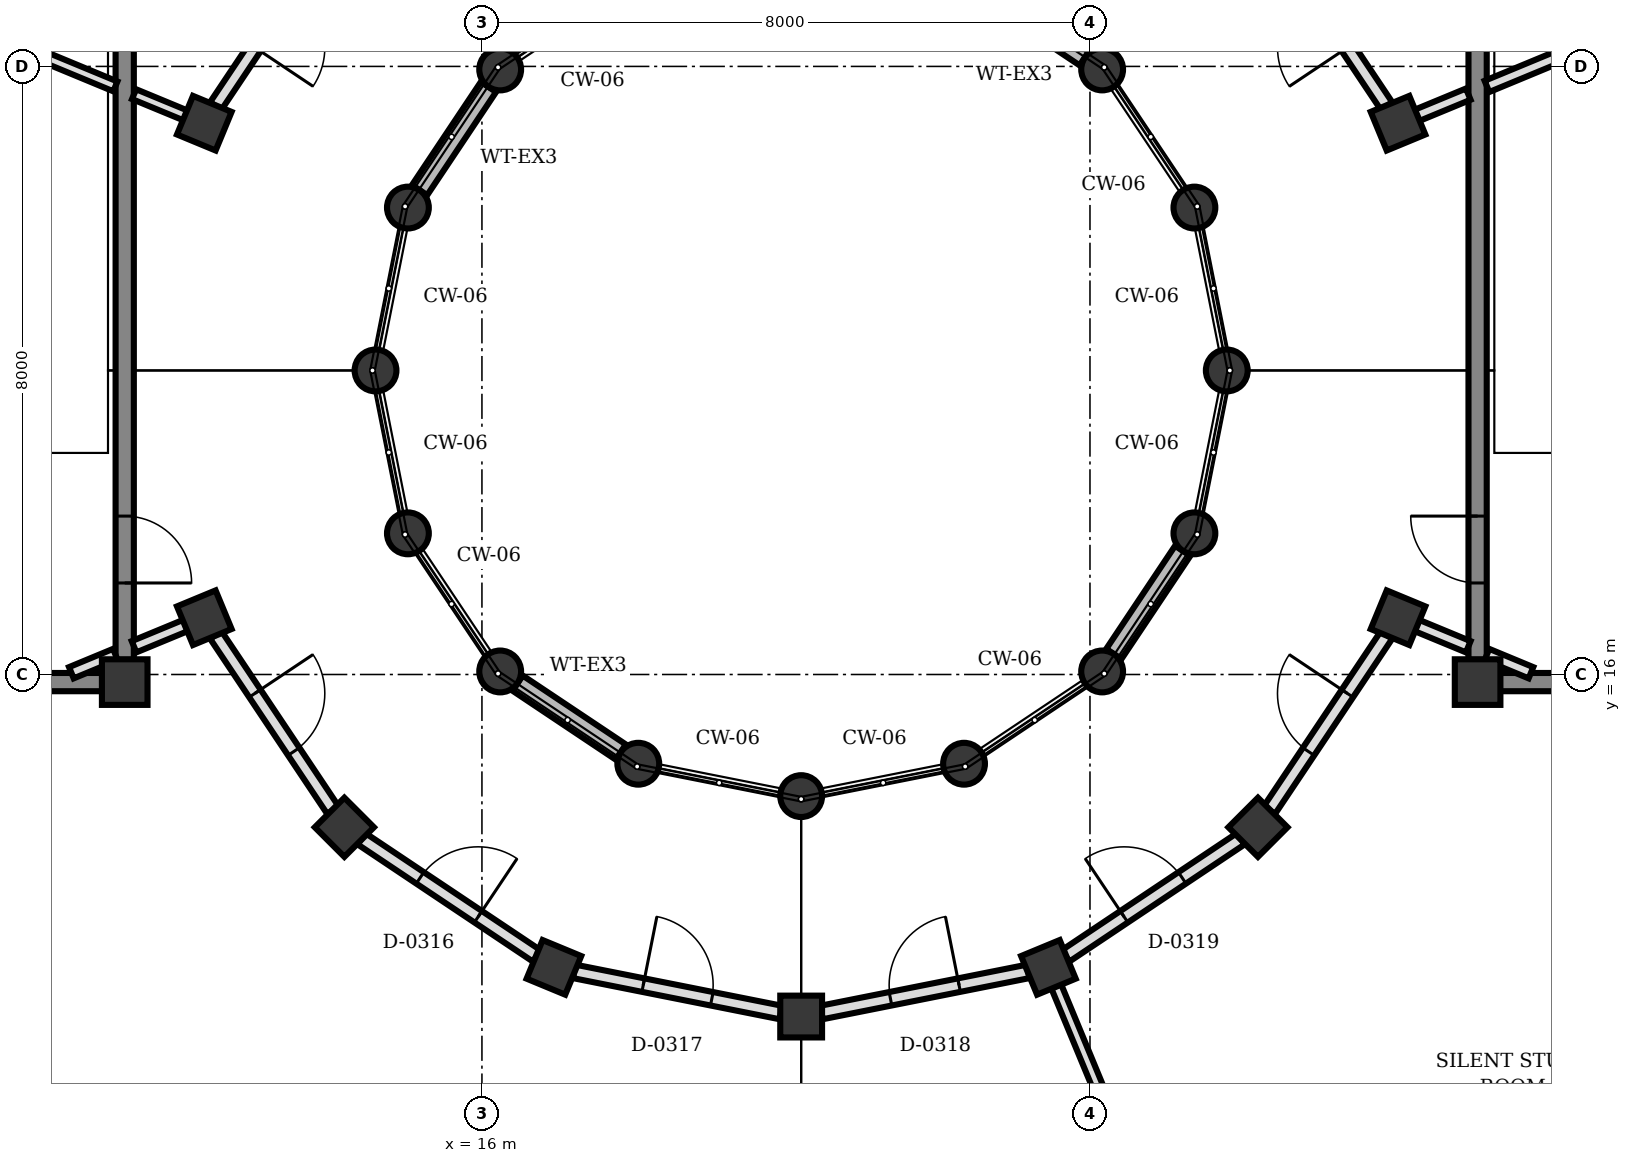
"""IFC4 building model, lengths in metres.
Left out: names, types, materials, properties, quantities, classifications, styles, units other than length and angle.
Written with IfcOpenShell. Run it as: python <this file> out.ifc"""

import sys

from ifc_helpers import new_model, si_unit, direction, frame, frame_2d, origin, origin_2d, place, context, subcontext, project, spatial, rectangle, circle, extrude, element, fill, save


model = new_model("IFC4")
c1 = context("Model", 3, precision=1e-05, world=origin(), true_north=direction((0.0, 1.0)))
c2 = subcontext(c1, "Body", "Model", "MODEL_VIEW")
j1 = project(units=[si_unit("LENGTHUNIT", "METRE"), si_unit("PLANEANGLEUNIT", "RADIAN")], contexts=[c1])
p1 = place(None, origin())
s1 = spatial("IfcSite", under=j1, at=p1, CompositionType="ELEMENT")
p2 = place(p1, origin())
s2 = spatial("IfcBuilding", under=s1, at=p2, CompositionType="ELEMENT")
p3 = place(p2, frame((0.0, 0.0, 12.5)))
s3 = spatial("IfcBuildingStorey", under=s2, at=p3, CompositionType="ELEMENT", Elevation=12.5)
for number, where, z_axis, x_axis in (
    (1, (11.3, 15.9, 0.0), (0.0, 0.0, 1.0), (1.0, 0.0, 0.0)),
    (2, (29.1, 15.9, 0.0), (0.0, 0.0, 1.0), (1.0, 0.0, 0.0)),
):
    element("IfcColumn", number, at=place(p3, frame(where, z_axis=z_axis, x_axis=x_axis)), inside=s3, PredefinedType="COLUMN", context=c2, shape_type="SweptSolid", body=[
        extrude(rectangle(XDim=0.6, YDim=0.6, at=origin_2d()), origin(), (0.0, 0.0, 1.0), 4.0),
    ])
for number, where, z_axis, x_axis in (
    (3, (25.8, 20.0, 0.0), (0.0, 0.0, 1.0), (1.0, 0.0, 0.0)),
    (4, (25.374, 22.143, 0.0), (0.0, 0.0, 1.0), (1.0, 0.0, 0.0)),
    (5, (24.16, 23.96, 0.0), (0.0, 0.0, 1.0), (1.0, 0.0, 0.0)),
    (6, (16.24, 23.96, 0.0), (0.0, 0.0, 1.0), (1.0, 0.0, 0.0)),
    (7, (15.026, 22.143, 0.0), (0.0, 0.0, 1.0), (1.0, 0.0, 0.0)),
    (8, (14.6, 20.0, 0.0), (0.0, 0.0, 1.0), (1.0, 0.0, 0.0)),
    (9, (15.026, 17.857, 0.0), (0.0, 0.0, 1.0), (1.0, 0.0, 0.0)),
    (10, (16.24, 16.04, 0.0), (0.0, 0.0, 1.0), (1.0, 0.0, 0.0)),
    (11, (18.057, 14.826, 0.0), (0.0, 0.0, 1.0), (1.0, 0.0, 0.0)),
    (12, (20.2, 14.4, 0.0), (0.0, 0.0, 1.0), (1.0, 0.0, 0.0)),
    (13, (22.343, 14.826, 0.0), (0.0, 0.0, 1.0), (1.0, 0.0, 0.0)),
    (14, (24.16, 16.04, 0.0), (0.0, 0.0, 1.0), (1.0, 0.0, 0.0)),
    (15, (25.374, 17.857, 0.0), (0.0, 0.0, 1.0), (1.0, 0.0, 0.0)),
):
    element("IfcColumn", number, at=place(p3, frame(where, z_axis=z_axis, x_axis=x_axis)), inside=s3, PredefinedType="COLUMN", context=c2, shape_type="SweptSolid", body=[
        extrude(circle(Radius=0.275, at=origin_2d()), origin(), (0.0, 0.0, 1.0), 3.865),
    ])
for number, where, z_axis, x_axis in (
    (16, (28.053, 23.253, 0.0), (0.0, 0.0, 1.0), (0.924, 0.383, 0.0)),
    (17, (12.347, 23.253, 0.0), (0.0, 0.0, 1.0), (-0.924, 0.383, 0.0)),
    (18, (12.347, 16.747, 0.0), (0.0, 0.0, 1.0), (-0.924, -0.383, 0.0)),
    (19, (14.19, 13.99, 0.0), (0.0, 0.0, 1.0), (-0.707, -0.707, 0.0)),
    (20, (16.947, 12.147, 0.0), (0.0, 0.0, 1.0), (-0.383, -0.924, 0.0)),
    (21, (20.2, 11.5, 0.0), (0.0, 0.0, 1.0), (0.0, -1.0, 0.0)),
    (22, (23.453, 12.147, 0.0), (0.0, 0.0, 1.0), (0.383, -0.924, 0.0)),
    (23, (26.21, 13.99, 0.0), (0.0, 0.0, 1.0), (0.707, -0.707, 0.0)),
    (24, (28.053, 16.747, 0.0), (0.0, 0.0, 1.0), (0.924, -0.383, 0.0)),
):
    element("IfcColumn", number, at=place(p3, frame(where, z_axis=z_axis, x_axis=x_axis)), inside=s3, PredefinedType="COLUMN", context=c2, shape_type="SweptSolid", body=[
        extrude(rectangle(XDim=0.55, YDim=0.55, at=origin_2d()), origin(), (0.0, 0.0, 1.0), 4.59),
    ])
for number, where, z_axis, x_axis in (
    (25, (23.93, 24.114, 0.0), (0.0, 0.0, 1.0), (-0.832, 0.555, 0.0)),
    (26, (16.086, 23.73, 0.0), (0.0, 0.0, 1.0), (-0.555, -0.832, 0.0)),
    (27, (16.47, 15.886, 0.0), (0.0, 0.0, 1.0), (0.832, -0.555, 0.0)),
    (28, (24.314, 16.27, 0.0), (0.0, 0.0, 1.0), (0.555, 0.832, 0.0)),
):
    element("IfcWall", number, at=place(p3, frame(where, z_axis=z_axis, x_axis=x_axis)), inside=s3, PredefinedType="SOLIDWALL", context=c2, shape_type="SweptSolid", body=[
        extrude(rectangle(XDim=1.632, YDim=0.24, at=frame_2d((0.816, 0.0))), origin(), (0.0, 0.0, 1.0), 3.375),
    ])
p4 = place(p3, frame((11.3, 24.328, 0.0), z_axis=(0.0, 0.0, 1.0), x_axis=(0.0, -1.0, 0.0)))
e29 = element("IfcWall", 29, at=p4, inside=s3, PredefinedType="SHEAR", context=c2, shape_type="SweptSolid", body=[
    extrude(rectangle(XDim=8.136, YDim=0.24, at=frame_2d((4.068, 0.0))), origin(), (0.0, 0.0, 1.0), 3.74),
])
p5 = place(p4, frame((6.244, 0.0, 0.0)))
e30 = element("IfcOpeningElement", 30, at=p5, cuts=e29, PredefinedType="OPENING", context=c2, shape_type="SweptSolid", body=[
    extrude(rectangle(XDim=0.88, YDim=2.1, at=frame_2d((0.44, 1.05))), frame((0.0, 0.13, 0.0), z_axis=(0.0, -1.0, 0.0), x_axis=(1.0, 0.0, 0.0)), (0.0, 0.0, 1.0), 0.26),
])
p6 = place(p3, frame((11.008, 15.9, 0.0), z_axis=(0.0, 0.0, 1.0), x_axis=(-1.0, 0.0, 0.0)))
e31 = element("IfcWall", 31, at=p6, inside=s3, PredefinedType="SHEAR", context=c2, shape_type="SweptSolid", body=[
    extrude(rectangle(XDim=4.216, YDim=0.24, at=frame_2d((2.108, 0.0))), origin(), (0.0, 0.0, 1.0), 3.74),
])
p7 = place(p3, frame((29.1, 16.192, 0.0), z_axis=(0.0, 0.0, 1.0), x_axis=(0.0, 1.0, 0.0)))
e32 = element("IfcWall", 32, at=p7, inside=s3, PredefinedType="SHEAR", context=c2, shape_type="SweptSolid", body=[
    extrude(rectangle(XDim=8.136, YDim=0.24, at=frame_2d((4.068, 0.0))), origin(), (0.0, 0.0, 1.0), 3.74),
])
p8 = place(p7, frame((1.012, 0.0, 0.0)))
e33 = element("IfcOpeningElement", 33, at=p8, cuts=e32, PredefinedType="OPENING", context=c2, shape_type="SweptSolid", body=[
    extrude(rectangle(XDim=0.88, YDim=2.1, at=frame_2d((0.44, 1.05))), frame((0.0, 0.13, 0.0), z_axis=(0.0, -1.0, 0.0), x_axis=(1.0, 0.0, 0.0)), (0.0, 0.0, 1.0), 0.26),
])
p9 = place(p3, frame((33.608, 15.9, 0.0), z_axis=(0.0, 0.0, 1.0), x_axis=(-1.0, 0.0, 0.0)))
e34 = element("IfcWall", 34, at=p9, inside=s3, PredefinedType="SHEAR", context=c2, shape_type="SweptSolid", body=[
    extrude(rectangle(XDim=4.216, YDim=0.24, at=frame_2d((2.108, 0.0))), origin(), (0.0, 0.0, 1.0), 3.74),
])
p10 = place(p3, frame((28.3, 23.355, 0.0), z_axis=(0.0, 0.0, 1.0), x_axis=(0.924069600435, 0.382224245113, 0.0)))
e35 = element("IfcWall", 35, at=p10, inside=s3, PredefinedType="PARTITIONING", context=c2, shape_type="SweptSolid", body=[
    extrude(rectangle(XDim=0.733, YDim=0.16, at=frame_2d((0.366, 0.0))), origin(), (0.0, 0.0, 1.0), 3.7),
])
p11 = place(p3, frame((29.223, 23.737, 0.0), z_axis=(0.0, 0.0, 1.0), x_axis=(0.923817443679, 0.382833293686, 0.0)))
e36 = element("IfcWall", 36, at=p11, inside=s3, PredefinedType="PARTITIONING", context=c2, shape_type="SweptSolid", body=[
    extrude(rectangle(XDim=1.985, YDim=0.16, at=frame_2d((0.993, 0.0))), origin(), (0.0, 0.0, 1.0), 3.7),
])
p12 = place(p3, frame((12.1, 23.355, 0.0), z_axis=(0.0, 0.0, 1.0), x_axis=(-0.924069600435, 0.382224245113, 0.0)))
e37 = element("IfcWall", 37, at=p12, inside=s3, PredefinedType="PARTITIONING", context=c2, shape_type="SweptSolid", body=[
    extrude(rectangle(XDim=0.733, YDim=0.14, at=frame_2d((0.366, 0.0))), origin(), (0.0, 0.0, 1.0), 3.7),
])
p13 = place(p3, frame((11.177, 23.737, 0.0), z_axis=(0.0, 0.0, 1.0), x_axis=(-0.923817443679, 0.382833293686, 0.0)))
e38 = element("IfcWall", 38, at=p13, inside=s3, PredefinedType="PARTITIONING", context=c2, shape_type="SweptSolid", body=[
    extrude(rectangle(XDim=1.985, YDim=0.14, at=frame_2d((0.993, 0.0))), origin(), (0.0, 0.0, 1.0), 3.7),
])
p14 = place(p3, frame((12.1, 16.645, 0.0), z_axis=(0.0, 0.0, 1.0), x_axis=(-0.924069600435, -0.382224245113, 0.0)))
e39 = element("IfcWall", 39, at=p14, inside=s3, PredefinedType="PARTITIONING", context=c2, shape_type="SweptSolid", body=[
    extrude(rectangle(XDim=0.733, YDim=0.16, at=frame_2d((0.366, 0.0))), origin(), (0.0, 0.0, 1.0), 3.7),
])
p15 = place(p3, frame((11.177, 16.263, 0.0), z_axis=(0.0, 0.0, 1.0), x_axis=(-0.923812676193, -0.382844797933, 0.0)))
e40 = element("IfcWall", 40, at=p15, inside=s3, PredefinedType="PARTITIONING", context=c2, shape_type="SweptSolid", body=[
    extrude(rectangle(XDim=0.627, YDim=0.16, at=frame_2d((0.313, 0.0))), origin(), (0.0, 0.0, 1.0), 3.7),
])
p16 = place(p3, frame((23.555, 11.9, 0.0), z_axis=(0.0, 0.0, 1.0), x_axis=(0.382683896966, -0.923879340067, 0.0)))
e41 = element("IfcWall", 41, at=p16, inside=s3, PredefinedType="PARTITIONING", context=c2, shape_type="SweptSolid", body=[
    extrude(rectangle(XDim=8.44, YDim=0.14, at=frame_2d((4.22, 0.0))), origin(), (0.0, 0.0, 1.0), 3.7),
])
p17 = place(p3, frame((28.3, 16.645, 0.0), z_axis=(0.0, 0.0, 1.0), x_axis=(0.924069600435, -0.382224245113, 0.0)))
e42 = element("IfcWall", 42, at=p17, inside=s3, PredefinedType="PARTITIONING", context=c2, shape_type="SweptSolid", body=[
    extrude(rectangle(XDim=0.733, YDim=0.16, at=frame_2d((0.366, 0.0))), origin(), (0.0, 0.0, 1.0), 3.7),
])
p18 = place(p3, frame((29.223, 16.263, 0.0), z_axis=(0.0, 0.0, 1.0), x_axis=(0.923812676193, -0.382844797933, 0.0)))
e43 = element("IfcWall", 43, at=p18, inside=s3, PredefinedType="PARTITIONING", context=c2, shape_type="SweptSolid", body=[
    extrude(rectangle(XDim=0.627, YDim=0.16, at=frame_2d((0.313, 0.0))), origin(), (0.0, 0.0, 1.0), 3.7),
])
p19 = place(p3, frame((27.902, 23.479, 0.0), z_axis=(0.0, 0.0, 1.0), x_axis=(-0.555797002478, 0.831318045056, 0.0)))
e44 = element("IfcWall", 44, at=p19, inside=s3, PredefinedType="PARTITIONING", context=c2, shape_type="SweptSolid", body=[
    extrude(rectangle(XDim=2.773, YDim=0.18, at=frame_2d((1.386, 0.0))), origin(), (0.0, 0.0, 1.0), 3.7),
])
p20 = place(p19, frame((0.926, 0.0, 0.0)))
e45 = element("IfcOpeningElement", 45, at=p20, cuts=e44, PredefinedType="OPENING", context=c2, shape_type="SweptSolid", body=[
    extrude(rectangle(XDim=0.92, YDim=2.1, at=frame_2d((0.46, 1.05))), frame((0.0, 0.1, 0.0), z_axis=(0.0, -1.0, 0.0), x_axis=(1.0, 0.0, 0.0)), (0.0, 0.0, 1.0), 0.2),
])
p21 = place(p3, frame((14.039, 25.784, 0.0), z_axis=(0.0, 0.0, 1.0), x_axis=(-0.555797002478, -0.831318045056, 0.0)))
e46 = element("IfcWall", 46, at=p21, inside=s3, PredefinedType="PARTITIONING", context=c2, shape_type="SweptSolid", body=[
    extrude(rectangle(XDim=2.773, YDim=0.18, at=frame_2d((1.386, 0.0))), origin(), (0.0, 0.0, 1.0), 3.7),
])
p22 = place(p21, frame((0.926, 0.0, 0.0)))
e47 = element("IfcOpeningElement", 47, at=p22, cuts=e46, PredefinedType="OPENING", context=c2, shape_type="SweptSolid", body=[
    extrude(rectangle(XDim=0.92, YDim=2.1, at=frame_2d((0.46, 1.05))), frame((0.0, 0.1, 0.0), z_axis=(0.0, -1.0, 0.0), x_axis=(1.0, 0.0, 0.0)), (0.0, 0.0, 1.0), 0.2),
])
p23 = place(p3, frame((12.498, 16.521, 0.0), z_axis=(0.0, 0.0, 1.0), x_axis=(0.555797002478, -0.831318045056, 0.0)))
e48 = element("IfcWall", 48, at=p23, inside=s3, PredefinedType="PARTITIONING", context=c2, shape_type="SweptSolid", body=[
    extrude(rectangle(XDim=2.773, YDim=0.18, at=frame_2d((1.386, 0.0))), origin(), (0.0, 0.0, 1.0), 3.7),
])
p24 = place(p23, frame((0.926, 0.0, 0.0)))
e49 = element("IfcOpeningElement", 49, at=p24, cuts=e48, PredefinedType="OPENING", context=c2, shape_type="SweptSolid", body=[
    extrude(rectangle(XDim=0.92, YDim=2.1, at=frame_2d((0.46, 1.05))), frame((0.0, 0.1, 0.0), z_axis=(0.0, -1.0, 0.0), x_axis=(1.0, 0.0, 0.0)), (0.0, 0.0, 1.0), 0.2),
])
p25 = place(p3, frame((14.416, 13.839, 0.0), z_axis=(0.0, 0.0, 1.0), x_axis=(0.831318045056, -0.555797002478, 0.0)))
e50 = element("IfcWall", 50, at=p25, inside=s3, PredefinedType="PARTITIONING", context=c2, shape_type="SweptSolid", body=[
    extrude(rectangle(XDim=2.773, YDim=0.18, at=frame_2d((1.386, 0.0))), origin(), (0.0, 0.0, 1.0), 3.7),
])
p26 = place(p25, frame((0.926, 0.0, 0.0)))
e51 = element("IfcOpeningElement", 51, at=p26, cuts=e50, PredefinedType="OPENING", context=c2, shape_type="SweptSolid", body=[
    extrude(rectangle(XDim=0.92, YDim=2.1, at=frame_2d((0.46, 1.05))), frame((0.0, 0.1, 0.0), z_axis=(0.0, -1.0, 0.0), x_axis=(1.0, 0.0, 0.0)), (0.0, 0.0, 1.0), 0.2),
])
p27 = place(p3, frame((17.214, 12.094, 0.0), z_axis=(0.0, 0.0, 1.0), x_axis=(0.980773264811, -0.195150718759, 0.0)))
e52 = element("IfcWall", 52, at=p27, inside=s3, PredefinedType="PARTITIONING", context=c2, shape_type="SweptSolid", body=[
    extrude(rectangle(XDim=2.772, YDim=0.18, at=frame_2d((1.386, 0.0))), origin(), (0.0, 0.0, 1.0), 3.7),
])
p28 = place(p27, frame((0.926, 0.0, 0.0)))
e53 = element("IfcOpeningElement", 53, at=p28, cuts=e52, PredefinedType="OPENING", context=c2, shape_type="SweptSolid", body=[
    extrude(rectangle(XDim=0.92, YDim=2.1, at=frame_2d((0.46, 1.05))), frame((0.0, 0.1, 0.0), z_axis=(0.0, -1.0, 0.0), x_axis=(1.0, 0.0, 0.0)), (0.0, 0.0, 1.0), 0.2),
])
p29 = place(p3, frame((20.467, 11.553, 0.0), z_axis=(0.0, 0.0, 1.0), x_axis=(0.980773264811, 0.195150718759, 0.0)))
e54 = element("IfcWall", 54, at=p29, inside=s3, PredefinedType="PARTITIONING", context=c2, shape_type="SweptSolid", body=[
    extrude(rectangle(XDim=2.772, YDim=0.18, at=frame_2d((1.386, 0.0))), origin(), (0.0, 0.0, 1.0), 3.7),
])
p30 = place(p29, frame((0.926, 0.0, 0.0)))
e55 = element("IfcOpeningElement", 55, at=p30, cuts=e54, PredefinedType="OPENING", context=c2, shape_type="SweptSolid", body=[
    extrude(rectangle(XDim=0.92, YDim=2.1, at=frame_2d((0.46, 1.05))), frame((0.0, 0.1, 0.0), z_axis=(0.0, -1.0, 0.0), x_axis=(1.0, 0.0, 0.0)), (0.0, 0.0, 1.0), 0.2),
])
p31 = place(p3, frame((23.679, 12.298, 0.0), z_axis=(0.0, 0.0, 1.0), x_axis=(0.831318045056, 0.555797002478, 0.0)))
e56 = element("IfcWall", 56, at=p31, inside=s3, PredefinedType="PARTITIONING", context=c2, shape_type="SweptSolid", body=[
    extrude(rectangle(XDim=2.773, YDim=0.18, at=frame_2d((1.386, 0.0))), origin(), (0.0, 0.0, 1.0), 3.7),
])
p32 = place(p31, frame((0.926, 0.0, 0.0)))
e57 = element("IfcOpeningElement", 57, at=p32, cuts=e56, PredefinedType="OPENING", context=c2, shape_type="SweptSolid", body=[
    extrude(rectangle(XDim=0.92, YDim=2.1, at=frame_2d((0.46, 1.05))), frame((0.0, 0.1, 0.0), z_axis=(0.0, -1.0, 0.0), x_axis=(1.0, 0.0, 0.0)), (0.0, 0.0, 1.0), 0.2),
])
p33 = place(p3, frame((26.361, 14.216, 0.0), z_axis=(0.0, 0.0, 1.0), x_axis=(0.555797002478, 0.831318045056, 0.0)))
e58 = element("IfcWall", 58, at=p33, inside=s3, PredefinedType="PARTITIONING", context=c2, shape_type="SweptSolid", body=[
    extrude(rectangle(XDim=2.773, YDim=0.18, at=frame_2d((1.386, 0.0))), origin(), (0.0, 0.0, 1.0), 3.7),
])
p34 = place(p33, frame((0.926, 0.0, 0.0)))
e59 = element("IfcOpeningElement", 59, at=p34, cuts=e58, PredefinedType="OPENING", context=c2, shape_type="SweptSolid", body=[
    extrude(rectangle(XDim=0.92, YDim=2.1, at=frame_2d((0.46, 1.05))), frame((0.0, 0.1, 0.0), z_axis=(0.0, -1.0, 0.0), x_axis=(1.0, 0.0, 0.0)), (0.0, 0.0, 1.0), 0.2),
])
p35 = place(p5, origin())
e60 = element("IfcDoor", 60, at=p35, inside=s3, OperationType="SINGLE_SWING_RIGHT", PredefinedType="DOOR", context=c2, shape_type="SweptSolid", body=[
    extrude(rectangle(XDim=0.88, YDim=2.1, at=frame_2d((0.44, 1.05))), frame((0.0, 0.025, 0.0), z_axis=(0.0, -1.0, 0.0), x_axis=(1.0, 0.0, 0.0)), (0.0, 0.0, 1.0), 0.05),
])
fill(e30, e60)
p36 = place(p8, origin())
e61 = element("IfcDoor", 61, at=p36, inside=s3, OperationType="SINGLE_SWING_RIGHT", PredefinedType="DOOR", context=c2, shape_type="SweptSolid", body=[
    extrude(rectangle(XDim=0.88, YDim=2.1, at=frame_2d((0.44, 1.05))), frame((0.0, 0.025, 0.0), z_axis=(0.0, -1.0, 0.0), x_axis=(1.0, 0.0, 0.0)), (0.0, 0.0, 1.0), 0.05),
])
fill(e33, e61)
p37 = place(p24, origin())
e62 = element("IfcDoor", 62, at=p37, inside=s3, OperationType="SINGLE_SWING_LEFT", PredefinedType="DOOR", context=c2, shape_type="SweptSolid", body=[
    extrude(rectangle(XDim=0.92, YDim=2.1, at=frame_2d((0.46, 1.05))), frame((0.0, 0.025, 0.0), z_axis=(0.0, -1.0, 0.0), x_axis=(1.0, 0.0, 0.0)), (0.0, 0.0, 1.0), 0.05),
])
fill(e49, e62)
p38 = place(p26, origin())
e63 = element("IfcDoor", 63, at=p38, inside=s3, OperationType="SINGLE_SWING_RIGHT", PredefinedType="DOOR", context=c2, shape_type="SweptSolid", body=[
    extrude(rectangle(XDim=0.92, YDim=2.1, at=frame_2d((0.46, 1.05))), frame((0.0, 0.025, 0.0), z_axis=(0.0, -1.0, 0.0), x_axis=(1.0, 0.0, 0.0)), (0.0, 0.0, 1.0), 0.05),
])
fill(e51, e63)
p39 = place(p28, origin())
e64 = element("IfcDoor", 64, at=p39, inside=s3, OperationType="SINGLE_SWING_LEFT", PredefinedType="DOOR", context=c2, shape_type="SweptSolid", body=[
    extrude(rectangle(XDim=0.92, YDim=2.1, at=frame_2d((0.46, 1.05))), frame((0.0, 0.025, 0.0), z_axis=(0.0, -1.0, 0.0), x_axis=(1.0, 0.0, 0.0)), (0.0, 0.0, 1.0), 0.05),
])
fill(e53, e64)
p40 = place(p30, origin())
e65 = element("IfcDoor", 65, at=p40, inside=s3, OperationType="SINGLE_SWING_RIGHT", PredefinedType="DOOR", context=c2, shape_type="SweptSolid", body=[
    extrude(rectangle(XDim=0.92, YDim=2.1, at=frame_2d((0.46, 1.05))), frame((0.0, 0.025, 0.0), z_axis=(0.0, -1.0, 0.0), x_axis=(1.0, 0.0, 0.0)), (0.0, 0.0, 1.0), 0.05),
])
fill(e55, e65)
p41 = place(p32, origin())
e66 = element("IfcDoor", 66, at=p41, inside=s3, OperationType="SINGLE_SWING_LEFT", PredefinedType="DOOR", context=c2, shape_type="SweptSolid", body=[
    extrude(rectangle(XDim=0.92, YDim=2.1, at=frame_2d((0.46, 1.05))), frame((0.0, 0.025, 0.0), z_axis=(0.0, -1.0, 0.0), x_axis=(1.0, 0.0, 0.0)), (0.0, 0.0, 1.0), 0.05),
])
fill(e57, e66)
p42 = place(p34, origin())
e67 = element("IfcDoor", 67, at=p42, inside=s3, OperationType="SINGLE_SWING_RIGHT", PredefinedType="DOOR", context=c2, shape_type="SweptSolid", body=[
    extrude(rectangle(XDim=0.92, YDim=2.1, at=frame_2d((0.46, 1.05))), frame((0.0, 0.025, 0.0), z_axis=(0.0, -1.0, 0.0), x_axis=(1.0, 0.0, 0.0)), (0.0, 0.0, 1.0), 0.05),
])
fill(e59, e67)
save(model, sys.argv[1])
